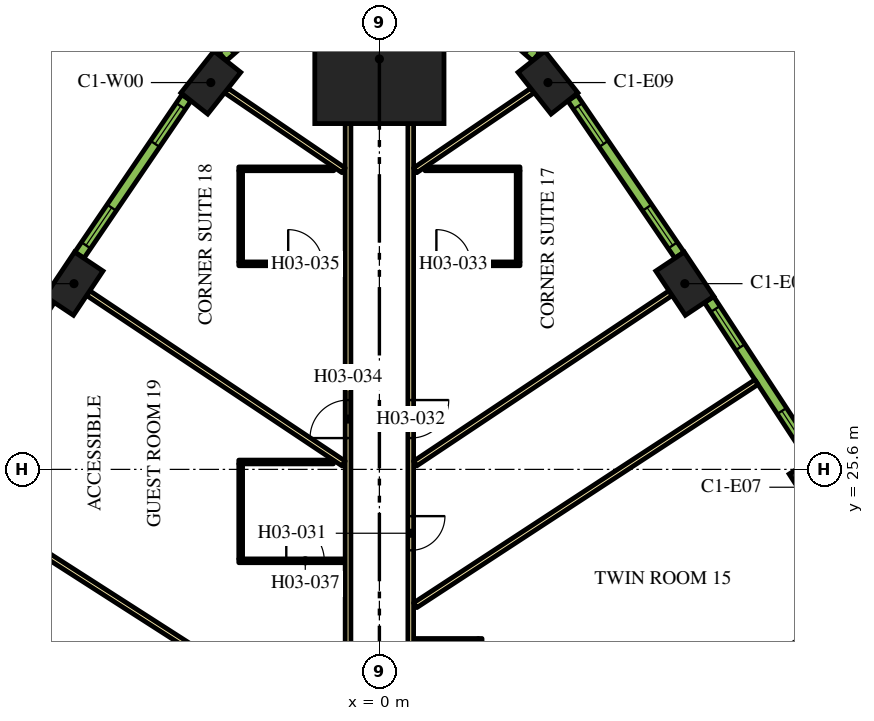
"""IFC4 building model, lengths in metres.
Left out: names, types, materials, properties, quantities, classifications, styles, units other than length and angle.
Written with IfcOpenShell. Run it as: python <this file> out.ifc"""

import sys

from ifc_helpers import new_model, si_unit, direction, frame, frame_2d, origin, origin_2d, place, context, subcontext, project, spatial, rectangle, extrude, element, fill, save


model = new_model("IFC4")
c1 = context("Model", 3, precision=1e-05, world=origin(), true_north=direction((0.0, 1.0)))
c2 = subcontext(c1, "Body", "Model", "MODEL_VIEW")
j1 = project(units=[si_unit("LENGTHUNIT", "METRE"), si_unit("PLANEANGLEUNIT", "RADIAN")], contexts=[c1])
p1 = place(None, origin())
s1 = spatial("IfcSite", under=j1, at=p1, CompositionType="ELEMENT")
p2 = place(p1, origin())
s2 = spatial("IfcBuilding", under=s1, at=p2, CompositionType="ELEMENT")
p3 = place(p2, frame((0.0, 0.0, 58.8)))
s3 = spatial("IfcBuildingStorey", under=s2, at=p3, CompositionType="ELEMENT", Elevation=58.8)
p4 = place(p3, frame((0.0, 36.399, 0.0), z_axis=(0.0, 0.0, 1.0), x_axis=(0.0, 1.0, 0.0)))
e1 = element("IfcColumn", 1, at=p4, inside=s3, PredefinedType="COLUMN", context=c2, shape_type="SweptSolid", body=[
    extrude(rectangle(XDim=3.4, YDim=3.4, at=origin_2d()), origin(), (0.0, 0.0, 1.0), 3.9),
])
for number, where, z_axis, x_axis in (
    (2, (11.539, 25.131, 0.0), (0.0, 0.0, 1.0), (-0.539, 0.842, 0.0)),
    (3, (8.037, 30.487, 0.0), (0.0, 0.0, 1.0), (-0.555, 0.832, 0.0)),
    (4, (4.436, 35.778, 0.0), (0.0, 0.0, 1.0), (-0.62, 0.784, 0.0)),
    (5, (-4.436, 35.778, 0.0), (0.0, 0.0, 1.0), (-0.62, -0.784, 0.0)),
    (6, (-8.037, 30.487, 0.0), (0.0, 0.0, 1.0), (-0.555, -0.832, 0.0)),
):
    element("IfcColumn", number, at=place(p3, frame(where, z_axis=z_axis, x_axis=x_axis)), inside=s3, PredefinedType="COLUMN", context=c2, shape_type="SweptSolid", body=[
        extrude(rectangle(XDim=1.4, YDim=0.9, at=origin_2d()), origin(), (0.0, 0.0, 1.0), 3.9),
    ])
p5 = place(p3, frame((0.825, 34.699, 0.0), z_axis=(0.0, 0.0, 1.0), x_axis=(0.0, -1.0, 0.0)))
e7 = element("IfcWall", 7, at=p5, inside=s3, PredefinedType="PARTITIONING", context=c2, shape_type="SweptSolid", body=[
    extrude(rectangle(XDim=16.144, YDim=0.15, at=frame_2d((8.072, 0.0))), origin(), (0.0, 0.0, 1.0), 2.75),
])
p6 = place(p5, frame((10.329, 0.0, 0.0)))
e8 = element("IfcOpeningElement", 8, at=p6, cuts=e7, PredefinedType="OPENING", context=c2, shape_type="SweptSolid", body=[
    extrude(rectangle(XDim=0.9, YDim=2.1, at=frame_2d((0.45, 1.05))), frame((0.0, 0.085, 0.0), z_axis=(0.0, -1.0, 0.0), x_axis=(1.0, 0.0, 0.0)), (0.0, 0.0, 1.0), 0.17),
])
p7 = place(p5, frame((7.275, 0.0, 0.0)))
e9 = element("IfcOpeningElement", 9, at=p7, cuts=e7, PredefinedType="OPENING", context=c2, shape_type="SweptSolid", body=[
    extrude(rectangle(XDim=1.0, YDim=2.1, at=frame_2d((0.5, 1.05))), frame((0.0, 0.085, 0.0), z_axis=(0.0, -1.0, 0.0), x_axis=(1.0, 0.0, 0.0)), (0.0, 0.0, 1.0), 0.17),
])
p8 = place(p3, frame((-0.825, 18.475, 0.0), z_axis=(0.0, 0.0, 1.0), x_axis=(0.0, 1.0, 0.0)))
e10 = element("IfcWall", 10, at=p8, inside=s3, PredefinedType="PARTITIONING", context=c2, shape_type="SweptSolid", body=[
    extrude(rectangle(XDim=16.224, YDim=0.15, at=frame_2d((8.112, 0.0))), origin(), (0.0, 0.0, 1.0), 2.75),
])
p9 = place(p8, frame((7.949, 0.0, 0.0)))
e11 = element("IfcOpeningElement", 11, at=p9, cuts=e10, PredefinedType="OPENING", context=c2, shape_type="SweptSolid", body=[
    extrude(rectangle(XDim=1.0, YDim=2.1, at=frame_2d((0.5, 1.05))), frame((0.0, 0.085, 0.0), z_axis=(0.0, -1.0, 0.0), x_axis=(1.0, 0.0, 0.0)), (0.0, 0.0, 1.0), 0.17),
])
p10 = place(p8, frame((0.526, 0.0, 0.0)))
e12 = element("IfcOpeningElement", 12, at=p10, cuts=e10, PredefinedType="OPENING", context=c2, shape_type="SweptSolid", body=[
    extrude(rectangle(XDim=1.1, YDim=2.1, at=frame_2d((0.55, 1.05))), frame((0.0, 0.085, 0.0), z_axis=(0.0, -1.0, 0.0), x_axis=(1.0, 0.0, 0.0)), (0.0, 0.0, 1.0), 0.17),
])
p11 = place(p3, frame((-4.028, 35.569, 0.0), z_axis=(0.0, 0.0, 1.0), x_axis=(0.826700206326, -0.56264266534, 0.0)))
e13 = element("IfcWall", 13, at=p11, inside=s3, PredefinedType="PARTITIONING", context=c2, shape_type="SweptSolid", body=[
    extrude(rectangle(XDim=3.733, YDim=0.15, at=frame_2d((1.867, 0.0))), origin(), (0.0, 0.0, 1.0), 2.75),
])
p12 = place(p3, frame((-11.16, 24.888, 0.0), z_axis=(0.0, 0.0, 1.0), x_axis=(0.84199813156, -0.539480441211, 0.0)))
e14 = element("IfcWall", 14, at=p12, inside=s3, PredefinedType="PARTITIONING", context=c2, shape_type="SweptSolid", body=[
    extrude(rectangle(XDim=11.638, YDim=0.15, at=frame_2d((5.819, 0.0))), origin(), (0.0, 0.0, 1.0), 2.75),
])
p13 = place(p3, frame((-7.662, 30.238, 0.0), z_axis=(0.0, 0.0, 1.0), x_axis=(0.831882886825, -0.554951225431, 0.0)))
e15 = element("IfcWall", 15, at=p13, inside=s3, PredefinedType="PARTITIONING", context=c2, shape_type="SweptSolid", body=[
    extrude(rectangle(XDim=8.079, YDim=0.15, at=frame_2d((4.04, 0.0))), origin(), (0.0, 0.0, 1.0), 2.75),
])
p14 = place(p3, frame((9.922, 27.896, 0.0), z_axis=(0.0, 0.0, 1.0), x_axis=(-0.836970816595, -0.547247523675, 0.0)))
e16 = element("IfcWall", 16, at=p14, inside=s3, PredefinedType="PARTITIONING", context=c2, shape_type="SweptSolid", body=[
    extrude(rectangle(XDim=10.729, YDim=0.15, at=frame_2d((5.364, 0.0))), origin(), (0.0, 0.0, 1.0), 2.75),
])
p15 = place(p3, frame((7.662, 30.238, 0.0), z_axis=(0.0, 0.0, 1.0), x_axis=(-0.831882886825, -0.554951225431, 0.0)))
e17 = element("IfcWall", 17, at=p15, inside=s3, PredefinedType="PARTITIONING", context=c2, shape_type="SweptSolid", body=[
    extrude(rectangle(XDim=8.079, YDim=0.15, at=frame_2d((4.04, 0.0))), origin(), (0.0, 0.0, 1.0), 2.75),
])
p16 = place(p3, frame((4.028, 35.569, 0.0), z_axis=(0.0, 0.0, 1.0), x_axis=(-0.826700206326, -0.56264266534, 0.0)))
e18 = element("IfcWall", 18, at=p16, inside=s3, PredefinedType="PARTITIONING", context=c2, shape_type="SweptSolid", body=[
    extrude(rectangle(XDim=3.733, YDim=0.15, at=frame_2d((1.867, 0.0))), origin(), (0.0, 0.0, 1.0), 2.75),
])
p17 = place(p3, frame((13.376, 22.506, 0.0), z_axis=(0.0, 0.0, 1.0), x_axis=(-0.846945608893, -0.531679542183, 0.0)))
e19 = element("IfcWall", 19, at=p17, inside=s3, PredefinedType="PARTITIONING", context=c2, shape_type="SweptSolid", body=[
    extrude(rectangle(XDim=8.182, YDim=0.15, at=frame_2d((4.091, 0.0))), origin(), (0.0, 0.0, 1.0), 2.75),
])
p18 = place(p3, frame((2.651, 18.55, 0.0), z_axis=(0.0, 0.0, 1.0), x_axis=(0.0, 1.0, 0.0)))
e20 = element("IfcWall", 20, at=p18, inside=s3, PredefinedType="PARTITIONING", context=c2, shape_type="SweptSolid", body=[
    extrude(rectangle(XDim=2.6, YDim=0.1, at=frame_2d((1.3, 0.0))), origin(), (0.0, 0.0, 1.0), 2.75),
])
p19 = place(p18, frame((0.6, 0.0, 0.0)))
e21 = element("IfcOpeningElement", 21, at=p19, cuts=e20, PredefinedType="OPENING", context=c2, shape_type="SweptSolid", body=[
    extrude(rectangle(XDim=0.9, YDim=2.1, at=frame_2d((0.45, 1.05))), frame((0.0, 0.06, 0.0), z_axis=(0.0, -1.0, 0.0), x_axis=(1.0, 0.0, 0.0)), (0.0, 0.0, 1.0), 0.12),
])
p20 = place(p3, frame((2.601, 21.1, 0.0), z_axis=(0.0, 0.0, 1.0), x_axis=(-1.0, 0.0, 0.0)))
e22 = element("IfcWall", 22, at=p20, inside=s3, PredefinedType="PARTITIONING", context=c2, shape_type="SweptSolid", body=[
    extrude(rectangle(XDim=1.7, YDim=0.1, at=frame_2d((0.85, 0.0))), origin(), (0.0, 0.0, 1.0), 2.75),
])
p21 = place(p3, frame((0.9, 31.009, 0.0), z_axis=(0.0, 0.0, 1.0), x_axis=(1.0, 0.0, 0.0)))
e23 = element("IfcWall", 23, at=p21, inside=s3, PredefinedType="PARTITIONING", context=c2, shape_type="SweptSolid", body=[
    extrude(rectangle(XDim=2.8, YDim=0.1, at=frame_2d((1.4, 0.0))), origin(), (0.0, 0.0, 1.0), 2.75),
])
p22 = place(p21, frame((0.6, 0.0, 0.0)))
e24 = element("IfcOpeningElement", 24, at=p22, cuts=e23, PredefinedType="OPENING", context=c2, shape_type="SweptSolid", body=[
    extrude(rectangle(XDim=0.9, YDim=2.1, at=frame_2d((0.45, 1.05))), frame((0.0, 0.06, 0.0), z_axis=(0.0, -1.0, 0.0), x_axis=(1.0, 0.0, 0.0)), (0.0, 0.0, 1.0), 0.12),
])
p23 = place(p3, frame((3.65, 31.059, 0.0), z_axis=(0.0, 0.0, 1.0), x_axis=(0.0, 1.0, 0.0)))
e25 = element("IfcWall", 25, at=p23, inside=s3, PredefinedType="PARTITIONING", context=c2, shape_type="SweptSolid", body=[
    extrude(rectangle(XDim=2.4, YDim=0.1, at=frame_2d((1.2, 0.0))), origin(), (0.0, 0.0, 1.0), 2.75),
])
p24 = place(p3, frame((1.2, 33.509, 0.0), z_axis=(0.0, 0.0, 1.0), x_axis=(1.0, 0.0, 0.0)))
e26 = element("IfcWall", 26, at=p24, inside=s3, PredefinedType="PARTITIONING", context=c2, shape_type="SweptSolid", body=[
    extrude(rectangle(XDim=2.5, YDim=0.1, at=frame_2d((1.25, 0.0))), origin(), (0.0, 0.0, 1.0), 2.75),
])
p25 = place(p3, frame((-3.7, 31.009, 0.0), z_axis=(0.0, 0.0, 1.0), x_axis=(1.0, 0.0, 0.0)))
e27 = element("IfcWall", 27, at=p25, inside=s3, PredefinedType="PARTITIONING", context=c2, shape_type="SweptSolid", body=[
    extrude(rectangle(XDim=2.8, YDim=0.1, at=frame_2d((1.4, 0.0))), origin(), (0.0, 0.0, 1.0), 2.75),
])
p26 = place(p25, frame((1.3, 0.0, 0.0)))
e28 = element("IfcOpeningElement", 28, at=p26, cuts=e27, PredefinedType="OPENING", context=c2, shape_type="SweptSolid", body=[
    extrude(rectangle(XDim=0.9, YDim=2.1, at=frame_2d((0.45, 1.05))), frame((0.0, 0.06, 0.0), z_axis=(0.0, -1.0, 0.0), x_axis=(1.0, 0.0, 0.0)), (0.0, 0.0, 1.0), 0.12),
])
p27 = place(p3, frame((-3.65, 31.059, 0.0), z_axis=(0.0, 0.0, 1.0), x_axis=(0.0, 1.0, 0.0)))
e29 = element("IfcWall", 29, at=p27, inside=s3, PredefinedType="PARTITIONING", context=c2, shape_type="SweptSolid", body=[
    extrude(rectangle(XDim=2.4, YDim=0.1, at=frame_2d((1.2, 0.0))), origin(), (0.0, 0.0, 1.0), 2.75),
])
p28 = place(p3, frame((-1.2, 33.509, 0.0), z_axis=(0.0, 0.0, 1.0), x_axis=(-1.0, 0.0, 0.0)))
e30 = element("IfcWall", 30, at=p28, inside=s3, PredefinedType="PARTITIONING", context=c2, shape_type="SweptSolid", body=[
    extrude(rectangle(XDim=2.5, YDim=0.1, at=frame_2d((1.25, 0.0))), origin(), (0.0, 0.0, 1.0), 2.75),
])
p29 = place(p3, frame((-3.7, 23.195, 0.0), z_axis=(0.0, 0.0, 1.0), x_axis=(1.0, 0.0, 0.0)))
e31 = element("IfcWall", 31, at=p29, inside=s3, PredefinedType="PARTITIONING", context=c2, shape_type="SweptSolid", body=[
    extrude(rectangle(XDim=2.8, YDim=0.1, at=frame_2d((1.4, 0.0))), origin(), (0.0, 0.0, 1.0), 2.75),
])
p30 = place(p29, frame((1.25, 0.0, 0.0)))
e32 = element("IfcOpeningElement", 32, at=p30, cuts=e31, PredefinedType="OPENING", context=c2, shape_type="SweptSolid", body=[
    extrude(rectangle(XDim=1.0, YDim=2.1, at=frame_2d((0.5, 1.05))), frame((0.0, 0.06, 0.0), z_axis=(0.0, -1.0, 0.0), x_axis=(1.0, 0.0, 0.0)), (0.0, 0.0, 1.0), 0.12),
])
p31 = place(p3, frame((-3.65, 23.245, 0.0), z_axis=(0.0, 0.0, 1.0), x_axis=(0.0, 1.0, 0.0)))
e33 = element("IfcWall", 33, at=p31, inside=s3, PredefinedType="PARTITIONING", context=c2, shape_type="SweptSolid", body=[
    extrude(rectangle(XDim=2.5, YDim=0.1, at=frame_2d((1.25, 0.0))), origin(), (0.0, 0.0, 1.0), 2.75),
])
p32 = place(p3, frame((-1.21, 25.795, 0.0), z_axis=(0.0, 0.0, 1.0), x_axis=(-1.0, 0.0, 0.0)))
e34 = element("IfcWall", 34, at=p32, inside=s3, PredefinedType="PARTITIONING", context=c2, shape_type="SweptSolid", body=[
    extrude(rectangle(XDim=2.49, YDim=0.1, at=frame_2d((1.245, 0.0))), origin(), (0.0, 0.0, 1.0), 2.75),
])
p33 = place(p3, frame((11.411, 25.884, 0.0), z_axis=(0.0, 0.0, 1.0), x_axis=(-0.547204617628, 0.836998868845, 0.0)))
e35 = element("IfcWall", 35, at=p33, inside=s3, PredefinedType="SOLIDWALL", context=c2, shape_type="SweptSolid", body=[
    extrude(rectangle(XDim=4.998, YDim=0.29, at=frame_2d((2.499, 0.0))), origin(), (0.0, 0.0, 1.0), 3.65),
])
p34 = place(p33, frame((0.297, 0.0, 0.9)))
e36 = element("IfcOpeningElement", 36, at=p34, cuts=e35, PredefinedType="OPENING", context=c2, shape_type="SweptSolid", body=[
    extrude(rectangle(XDim=1.2, YDim=2.15, at=frame_2d((0.6, 1.075))), frame((0.0, 0.155, 0.0), z_axis=(0.0, -1.0, 0.0), x_axis=(1.0, 0.0, 0.0)), (0.0, 0.0, 1.0), 0.31),
])
p35 = place(p33, frame((3.501, 0.0, 0.9)))
e37 = element("IfcOpeningElement", 37, at=p35, cuts=e35, PredefinedType="OPENING", context=c2, shape_type="SweptSolid", body=[
    extrude(rectangle(XDim=1.2, YDim=2.15, at=frame_2d((0.6, 1.075))), frame((0.0, 0.155, 0.0), z_axis=(0.0, -1.0, 0.0), x_axis=(1.0, 0.0, 0.0)), (0.0, 0.0, 1.0), 0.31),
])
p36 = place(p3, frame((7.895, 31.238, 0.0), z_axis=(0.0, 0.0, 1.0), x_axis=(-0.562610153679, 0.826722332454, 0.0)))
e38 = element("IfcWall", 38, at=p36, inside=s3, PredefinedType="SOLIDWALL", context=c2, shape_type="SweptSolid", body=[
    extrude(rectangle(XDim=5.006, YDim=0.29, at=frame_2d((2.503, 0.0))), origin(), (0.0, 0.0, 1.0), 3.65),
])
p37 = place(p36, frame((0.31, 0.0, 0.9)))
e39 = element("IfcOpeningElement", 39, at=p37, cuts=e38, PredefinedType="OPENING", context=c2, shape_type="SweptSolid", body=[
    extrude(rectangle(XDim=1.2, YDim=2.15, at=frame_2d((0.6, 1.075))), frame((0.0, 0.155, 0.0), z_axis=(0.0, -1.0, 0.0), x_axis=(1.0, 0.0, 0.0)), (0.0, 0.0, 1.0), 0.31),
])
p38 = place(p36, frame((3.541, 0.0, 0.9)))
e40 = element("IfcOpeningElement", 40, at=p38, cuts=e38, PredefinedType="OPENING", context=c2, shape_type="SweptSolid", body=[
    extrude(rectangle(XDim=1.2, YDim=2.15, at=frame_2d((0.6, 1.075))), frame((0.0, 0.155, 0.0), z_axis=(0.0, -1.0, 0.0), x_axis=(1.0, 0.0, 0.0)), (0.0, 0.0, 1.0), 0.31),
])
p39 = place(p3, frame((4.125, 36.459, 0.0), z_axis=(0.0, 0.0, 1.0), x_axis=(-0.749812680302, 0.661650167731, 0.0)))
e41 = element("IfcWall", 41, at=p39, inside=s3, PredefinedType="SOLIDWALL", context=c2, shape_type="SweptSolid", body=[
    extrude(rectangle(XDim=1.415, YDim=0.29, at=frame_2d((0.708, 0.0))), origin(), (0.0, 0.0, 1.0), 3.65),
])
p40 = place(p39, frame((0.258, 0.0, 0.9)))
e42 = element("IfcOpeningElement", 42, at=p40, cuts=e41, PredefinedType="OPENING", context=c2, shape_type="SweptSolid", body=[
    extrude(rectangle(XDim=0.9, YDim=2.15, at=frame_2d((0.45, 1.075))), frame((0.0, 0.155, 0.0), z_axis=(0.0, -1.0, 0.0), x_axis=(1.0, 0.0, 0.0)), (0.0, 0.0, 1.0), 0.31),
])
p41 = place(p3, frame((-3.064, 37.395, 0.0), z_axis=(0.0, 0.0, 1.0), x_axis=(-0.749812680302, -0.661650167731, 0.0)))
e43 = element("IfcWall", 43, at=p41, inside=s3, PredefinedType="SOLIDWALL", context=c2, shape_type="SweptSolid", body=[
    extrude(rectangle(XDim=1.415, YDim=0.29, at=frame_2d((0.708, 0.0))), origin(), (0.0, 0.0, 1.0), 3.65),
])
p42 = place(p41, frame((0.258, 0.0, 0.9)))
e44 = element("IfcOpeningElement", 44, at=p42, cuts=e43, PredefinedType="OPENING", context=c2, shape_type="SweptSolid", body=[
    extrude(rectangle(XDim=0.9, YDim=2.15, at=frame_2d((0.45, 1.075))), frame((0.0, 0.155, 0.0), z_axis=(0.0, -1.0, 0.0), x_axis=(1.0, 0.0, 0.0)), (0.0, 0.0, 1.0), 0.31),
])
p43 = place(p3, frame((-5.078, 35.376, 0.0), z_axis=(0.0, 0.0, 1.0), x_axis=(-0.562610153679, -0.826722332454, 0.0)))
e45 = element("IfcWall", 45, at=p43, inside=s3, PredefinedType="SOLIDWALL", context=c2, shape_type="SweptSolid", body=[
    extrude(rectangle(XDim=5.006, YDim=0.29, at=frame_2d((2.503, 0.0))), origin(), (0.0, 0.0, 1.0), 3.65),
])
p44 = place(p43, frame((0.265, 0.0, 0.9)))
e46 = element("IfcOpeningElement", 46, at=p44, cuts=e45, PredefinedType="OPENING", context=c2, shape_type="SweptSolid", body=[
    extrude(rectangle(XDim=1.2, YDim=2.15, at=frame_2d((0.6, 1.075))), frame((0.0, 0.155, 0.0), z_axis=(0.0, -1.0, 0.0), x_axis=(1.0, 0.0, 0.0)), (0.0, 0.0, 1.0), 0.31),
])
p45 = place(p43, frame((3.495, 0.0, 0.9)))
e47 = element("IfcOpeningElement", 47, at=p45, cuts=e45, PredefinedType="OPENING", context=c2, shape_type="SweptSolid", body=[
    extrude(rectangle(XDim=1.2, YDim=2.15, at=frame_2d((0.6, 1.075))), frame((0.0, 0.155, 0.0), z_axis=(0.0, -1.0, 0.0), x_axis=(1.0, 0.0, 0.0)), (0.0, 0.0, 1.0), 0.31),
])
p46 = place(p3, frame((-8.676, 30.068, 0.0), z_axis=(0.0, 0.0, 1.0), x_axis=(-0.547204617628, -0.836998868845, 0.0)))
e48 = element("IfcWall", 48, at=p46, inside=s3, PredefinedType="SOLIDWALL", context=c2, shape_type="SweptSolid", body=[
    extrude(rectangle(XDim=4.998, YDim=0.29, at=frame_2d((2.499, 0.0))), origin(), (0.0, 0.0, 1.0), 3.65),
])
p47 = place(p46, frame((0.297, 0.0, 0.9)))
e49 = element("IfcOpeningElement", 49, at=p47, cuts=e48, PredefinedType="OPENING", context=c2, shape_type="SweptSolid", body=[
    extrude(rectangle(XDim=1.2, YDim=2.15, at=frame_2d((0.6, 1.075))), frame((0.0, 0.155, 0.0), z_axis=(0.0, -1.0, 0.0), x_axis=(1.0, 0.0, 0.0)), (0.0, 0.0, 1.0), 0.31),
])
p48 = place(p46, frame((3.501, 0.0, 0.9)))
e50 = element("IfcOpeningElement", 50, at=p48, cuts=e48, PredefinedType="OPENING", context=c2, shape_type="SweptSolid", body=[
    extrude(rectangle(XDim=1.2, YDim=2.15, at=frame_2d((0.6, 1.075))), frame((0.0, 0.155, 0.0), z_axis=(0.0, -1.0, 0.0), x_axis=(1.0, 0.0, 0.0)), (0.0, 0.0, 1.0), 0.31),
])
p49 = place(p6, origin())
e51 = element("IfcDoor", 51, at=p49, inside=s3, OperationType="SINGLE_SWING_RIGHT", PredefinedType="DOOR", context=c2, shape_type="SweptSolid", body=[
    extrude(rectangle(XDim=0.9, YDim=2.1, at=frame_2d((0.45, 1.05))), frame((0.0, 0.025, 0.0), z_axis=(0.0, -1.0, 0.0), x_axis=(1.0, 0.0, 0.0)), (0.0, 0.0, 1.0), 0.05),
])
fill(e8, e51)
p50 = place(p7, origin())
e52 = element("IfcDoor", 52, at=p50, inside=s3, OperationType="SINGLE_SWING_RIGHT", PredefinedType="DOOR", context=c2, shape_type="SweptSolid", body=[
    extrude(rectangle(XDim=1.0, YDim=2.1, at=frame_2d((0.5, 1.05))), frame((0.0, 0.025, 0.0), z_axis=(0.0, -1.0, 0.0), x_axis=(1.0, 0.0, 0.0)), (0.0, 0.0, 1.0), 0.05),
])
fill(e9, e52)
p51 = place(p22, origin())
e53 = element("IfcDoor", 53, at=p51, inside=s3, OperationType="SINGLE_SWING_LEFT", PredefinedType="DOOR", context=c2, shape_type="SweptSolid", body=[
    extrude(rectangle(XDim=0.9, YDim=2.1, at=frame_2d((0.45, 1.05))), frame((0.0, 0.025, 0.0), z_axis=(0.0, -1.0, 0.0), x_axis=(1.0, 0.0, 0.0)), (0.0, 0.0, 1.0), 0.05),
])
fill(e24, e53)
p52 = place(p9, origin())
e54 = element("IfcDoor", 54, at=p52, inside=s3, OperationType="SINGLE_SWING_LEFT", PredefinedType="DOOR", context=c2, shape_type="SweptSolid", body=[
    extrude(rectangle(XDim=1.0, YDim=2.1, at=frame_2d((0.5, 1.05))), frame((0.0, 0.025, 0.0), z_axis=(0.0, -1.0, 0.0), x_axis=(1.0, 0.0, 0.0)), (0.0, 0.0, 1.0), 0.05),
])
fill(e11, e54)
p53 = place(p26, origin())
e55 = element("IfcDoor", 55, at=p53, inside=s3, OperationType="SINGLE_SWING_RIGHT", PredefinedType="DOOR", context=c2, shape_type="SweptSolid", body=[
    extrude(rectangle(XDim=0.9, YDim=2.1, at=frame_2d((0.45, 1.05))), frame((0.0, 0.025, 0.0), z_axis=(0.0, -1.0, 0.0), x_axis=(1.0, 0.0, 0.0)), (0.0, 0.0, 1.0), 0.05),
])
fill(e28, e55)
p54 = place(p30, origin())
e56 = element("IfcDoor", 56, at=p54, inside=s3, OperationType="SINGLE_SWING_LEFT", PredefinedType="DOOR", context=c2, shape_type="SweptSolid", body=[
    extrude(rectangle(XDim=1.0, YDim=2.1, at=frame_2d((0.5, 1.05))), frame((0.0, 0.025, 0.0), z_axis=(0.0, -1.0, 0.0), x_axis=(1.0, 0.0, 0.0)), (0.0, 0.0, 1.0), 0.05),
])
fill(e32, e56)
p55 = place(p34, origin())
e57 = element("IfcWindow", 57, at=p55, inside=s3, PartitioningType="DOUBLE_PANEL_VERTICAL", PredefinedType="WINDOW", context=c2, shape_type="SweptSolid", body=[
    extrude(rectangle(XDim=1.2, YDim=2.15, at=frame_2d((0.6, 1.075))), frame((0.0, 0.015, 0.0), z_axis=(0.0, -1.0, 0.0), x_axis=(1.0, 0.0, 0.0)), (0.0, 0.0, 1.0), 0.06),
])
fill(e36, e57)
p56 = place(p35, origin())
e58 = element("IfcWindow", 58, at=p56, inside=s3, PartitioningType="DOUBLE_PANEL_VERTICAL", PredefinedType="WINDOW", context=c2, shape_type="SweptSolid", body=[
    extrude(rectangle(XDim=1.2, YDim=2.15, at=frame_2d((0.6, 1.075))), frame((0.0, 0.015, 0.0), z_axis=(0.0, -1.0, 0.0), x_axis=(1.0, 0.0, 0.0)), (0.0, 0.0, 1.0), 0.06),
])
fill(e37, e58)
p57 = place(p37, origin())
e59 = element("IfcWindow", 59, at=p57, inside=s3, PartitioningType="DOUBLE_PANEL_VERTICAL", PredefinedType="WINDOW", context=c2, shape_type="SweptSolid", body=[
    extrude(rectangle(XDim=1.2, YDim=2.15, at=frame_2d((0.6, 1.075))), frame((0.0, 0.015, 0.0), z_axis=(0.0, -1.0, 0.0), x_axis=(1.0, 0.0, 0.0)), (0.0, 0.0, 1.0), 0.06),
])
fill(e39, e59)
p58 = place(p38, origin())
e60 = element("IfcWindow", 60, at=p58, inside=s3, PartitioningType="DOUBLE_PANEL_VERTICAL", PredefinedType="WINDOW", context=c2, shape_type="SweptSolid", body=[
    extrude(rectangle(XDim=1.2, YDim=2.15, at=frame_2d((0.6, 1.075))), frame((0.0, 0.015, 0.0), z_axis=(0.0, -1.0, 0.0), x_axis=(1.0, 0.0, 0.0)), (0.0, 0.0, 1.0), 0.06),
])
fill(e40, e60)
p59 = place(p44, origin())
e61 = element("IfcWindow", 61, at=p59, inside=s3, PartitioningType="DOUBLE_PANEL_VERTICAL", PredefinedType="WINDOW", context=c2, shape_type="SweptSolid", body=[
    extrude(rectangle(XDim=1.2, YDim=2.15, at=frame_2d((0.6, 1.075))), frame((0.0, 0.015, 0.0), z_axis=(0.0, -1.0, 0.0), x_axis=(1.0, 0.0, 0.0)), (0.0, 0.0, 1.0), 0.06),
])
fill(e46, e61)
p60 = place(p45, origin())
e62 = element("IfcWindow", 62, at=p60, inside=s3, PartitioningType="DOUBLE_PANEL_VERTICAL", PredefinedType="WINDOW", context=c2, shape_type="SweptSolid", body=[
    extrude(rectangle(XDim=1.2, YDim=2.15, at=frame_2d((0.6, 1.075))), frame((0.0, 0.015, 0.0), z_axis=(0.0, -1.0, 0.0), x_axis=(1.0, 0.0, 0.0)), (0.0, 0.0, 1.0), 0.06),
])
fill(e47, e62)
save(model, sys.argv[1])
